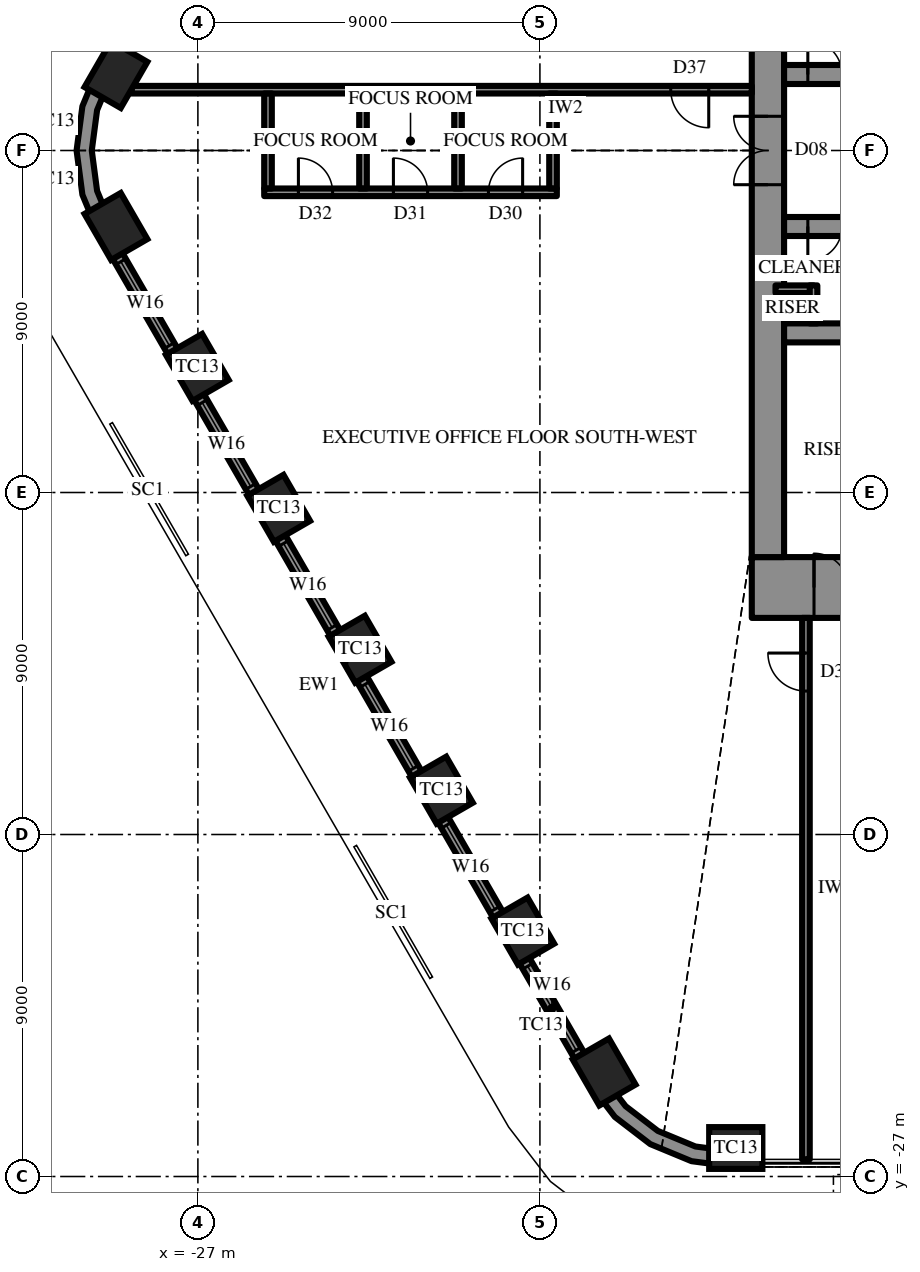
"""IFC4 building model, lengths in metres.
Left out: names, types, materials, properties, quantities, classifications, styles, units other than length and angle.
Written with IfcOpenShell. Run it as: python <this file> out.ifc"""

import sys

from ifc_helpers import new_model, si_unit, direction, frame, frame_2d, origin, origin_2d, place, context, subcontext, project, spatial, polyline, rectangle, outline, extrude, element, fill, save


model = new_model("IFC4")
c1 = context("Model", 3, precision=1e-05, world=origin(), true_north=direction((0.0, 1.0)))
c2 = subcontext(c1, "Body", "Model", "MODEL_VIEW")
j1 = project(units=[si_unit("LENGTHUNIT", "METRE"), si_unit("PLANEANGLEUNIT", "RADIAN")], contexts=[c1])
p1 = place(None, origin())
s1 = spatial("IfcSite", under=j1, at=p1, CompositionType="ELEMENT")
p2 = place(p1, origin())
s2 = spatial("IfcBuilding", under=s1, at=p2, CompositionType="ELEMENT")
p3 = place(p2, frame((0.0, 0.0, 315.7)))
s3 = spatial("IfcBuildingStorey", under=s2, at=p3, CompositionType="ELEMENT", Elevation=315.7)
for number, where, z_axis, x_axis in (
    (1, (-29.156, 2.0, 0.0), (0.0, 0.0, 1.0), (-0.5, -0.866, 0.0)),
    (2, (-29.156, -2.0, 0.0), (0.0, 0.0, 1.0), (0.5, -0.866, 0.0)),
    (3, (-27.015, -5.708, 0.0), (0.0, 0.0, 1.0), (0.5, -0.866, 0.0)),
    (4, (-24.874, -9.417, 0.0), (0.0, 0.0, 1.0), (0.5, -0.866, 0.0)),
    (5, (-22.733, -13.125, 0.0), (0.0, 0.0, 1.0), (0.5, -0.866, 0.0)),
    (6, (-20.592, -16.833, 0.0), (0.0, 0.0, 1.0), (0.5, -0.866, 0.0)),
    (7, (-18.451, -20.542, 0.0), (0.0, 0.0, 1.0), (0.5, -0.866, 0.0)),
    (8, (-16.31, -24.25, 0.0), (0.0, 0.0, 1.0), (0.5, -0.866, 0.0)),
    (9, (-12.846, -26.25, 0.0), (0.0, 0.0, 1.0), (1.0, 0.0, 0.0)),
):
    element("IfcColumn", number, at=place(p3, frame(where, z_axis=z_axis, x_axis=x_axis)), inside=s3, PredefinedType="COLUMN", context=c2, shape_type="SweptSolid", body=[
        extrude(rectangle(XDim=1.4, YDim=1.1, at=origin_2d()), origin(), (0.0, 0.0, 1.0), 4.2),
    ])
p4 = place(p3, frame((12.425, -11.5, 0.0), z_axis=(0.0, 0.0, 1.0), x_axis=(-1.0, 0.0, 0.0)))
e10 = element("IfcWall", 10, at=p4, inside=s3, PredefinedType="SHEAR", context=c2, shape_type="SweptSolid", body=[
    extrude(rectangle(XDim=24.85, YDim=1.6, at=frame_2d((12.425, 0.0))), origin(), (0.0, 0.0, 1.0), 4.2),
])
p5 = place(p4, frame((13.275, 0.0, 0.0)))
e11 = element("IfcOpeningElement", 11, at=p5, cuts=e10, PredefinedType="OPENING", context=c2, shape_type="SweptSolid", body=[
    extrude(rectangle(XDim=0.9, YDim=2.2, at=frame_2d((0.45, 1.1))), frame((0.0, 0.81, 0.0), z_axis=(0.0, -1.0, 0.0), x_axis=(1.0, 0.0, 0.0)), (0.0, 0.0, 1.0), 1.62),
])
p6 = place(p4, frame((16.275, 0.0, 0.0)))
e12 = element("IfcOpeningElement", 12, at=p6, cuts=e10, PredefinedType="OPENING", context=c2, shape_type="SweptSolid", body=[
    extrude(rectangle(XDim=0.9, YDim=2.2, at=frame_2d((0.45, 1.1))), frame((0.0, 0.81, 0.0), z_axis=(0.0, -1.0, 0.0), x_axis=(1.0, 0.0, 0.0)), (0.0, 0.0, 1.0), 1.62),
])
p7 = place(p4, frame((19.325, 0.0, 0.0)))
e13 = element("IfcOpeningElement", 13, at=p7, cuts=e10, PredefinedType="OPENING", context=c2, shape_type="SweptSolid", body=[
    extrude(rectangle(XDim=1.0, YDim=2.2, at=frame_2d((0.5, 1.1))), frame((0.0, 0.81, 0.0), z_axis=(0.0, -1.0, 0.0), x_axis=(1.0, 0.0, 0.0)), (0.0, 0.0, 1.0), 1.62),
])
p8 = place(p4, frame((1.637, 0.0, 0.0)))
e14 = element("IfcOpeningElement", 14, at=p8, cuts=e10, PredefinedType="OPENING", context=c2, shape_type="SweptSolid", body=[
    extrude(rectangle(XDim=0.9, YDim=2.2, at=frame_2d((0.45, 1.1))), frame((0.0, 0.81, 0.0), z_axis=(0.0, -1.0, 0.0), x_axis=(1.0, 0.0, 0.0)), (0.0, 0.0, 1.0), 1.62),
])
p9 = place(p4, frame((22.312, 0.0, 0.0)))
e15 = element("IfcOpeningElement", 15, at=p9, cuts=e10, PredefinedType="OPENING", context=c2, shape_type="SweptSolid", body=[
    extrude(rectangle(XDim=0.9, YDim=2.2, at=frame_2d((0.45, 1.1))), frame((0.0, 0.81, 0.0), z_axis=(0.0, -1.0, 0.0), x_axis=(1.0, 0.0, 0.0)), (0.0, 0.0, 1.0), 1.62),
])
p10 = place(p3, frame((-12.0, 10.7, 0.0), z_axis=(0.0, 0.0, 1.0), x_axis=(0.0, -1.0, 0.0)))
e16 = element("IfcWall", 16, at=p10, inside=s3, PredefinedType="SHEAR", context=c2, shape_type="SweptSolid", body=[
    extrude(rectangle(XDim=21.4, YDim=0.85, at=frame_2d((10.7, 0.0))), origin(), (0.0, 0.0, 1.0), 4.2),
])
p11 = place(p10, frame((9.8, 0.0, 0.0)))
e17 = element("IfcOpeningElement", 17, at=p11, cuts=e16, PredefinedType="OPENING", context=c2, shape_type="SweptSolid", body=[
    extrude(rectangle(XDim=1.8, YDim=2.4, at=frame_2d((0.9, 1.2))), frame((0.0, 0.435, 0.0), z_axis=(0.0, -1.0, 0.0), x_axis=(1.0, 0.0, 0.0)), (0.0, 0.0, 1.0), 0.87),
])
p12 = place(p3, frame((-11.575, 2.0, 0.0), z_axis=(0.0, 0.0, 1.0), x_axis=(1.0, 0.0, 0.0)))
e18 = element("IfcWall", 18, at=p12, inside=s3, PredefinedType="SHEAR", context=c2, shape_type="SweptSolid", body=[
    extrude(rectangle(XDim=5.775, YDim=0.5, at=frame_2d((2.887, 0.0))), origin(), (0.0, 0.0, 1.0), 4.2),
])
p13 = place(p12, frame((0.625, 0.0, 0.0)))
e19 = element("IfcOpeningElement", 19, at=p13, cuts=e18, PredefinedType="OPENING", context=c2, shape_type="SweptSolid", body=[
    extrude(rectangle(XDim=0.9, YDim=2.2, at=frame_2d((0.45, 1.1))), frame((0.0, 0.26, 0.0), z_axis=(0.0, -1.0, 0.0), x_axis=(1.0, 0.0, 0.0)), (0.0, 0.0, 1.0), 0.52),
])
p14 = place(p3, frame((3.2, -2.0, 0.0), z_axis=(0.0, 0.0, 1.0), x_axis=(-1.0, 0.0, 0.0)))
e20 = element("IfcWall", 20, at=p14, inside=s3, PredefinedType="SHEAR", context=c2, shape_type="SweptSolid", body=[
    extrude(rectangle(XDim=14.775, YDim=0.5, at=frame_2d((7.387, 0.0))), origin(), (0.0, 0.0, 1.0), 4.2),
])
p15 = place(p14, frame((13.25, 0.0, 0.0)))
e21 = element("IfcOpeningElement", 21, at=p15, cuts=e20, PredefinedType="OPENING", context=c2, shape_type="SweptSolid", body=[
    extrude(rectangle(XDim=0.9, YDim=2.2, at=frame_2d((0.45, 1.1))), frame((0.0, 0.26, 0.0), z_axis=(0.0, -1.0, 0.0), x_axis=(1.0, 0.0, 0.0)), (0.0, 0.0, 1.0), 0.52),
])
p16 = place(p14, frame((1.15, 0.0, 0.0)))
e22 = element("IfcOpeningElement", 22, at=p16, cuts=e20, PredefinedType="OPENING", context=c2, shape_type="SweptSolid", body=[
    extrude(rectangle(XDim=1.1, YDim=2.2, at=frame_2d((0.55, 1.1))), frame((0.0, 0.26, 0.0), z_axis=(0.0, -1.0, 0.0), x_axis=(1.0, 0.0, 0.0)), (0.0, 0.0, 1.0), 0.52),
])
p17 = place(p14, frame((4.15, 0.0, 0.0)))
e23 = element("IfcOpeningElement", 23, at=p17, cuts=e20, PredefinedType="OPENING", context=c2, shape_type="SweptSolid", body=[
    extrude(rectangle(XDim=1.1, YDim=2.2, at=frame_2d((0.55, 1.1))), frame((0.0, 0.26, 0.0), z_axis=(0.0, -1.0, 0.0), x_axis=(1.0, 0.0, 0.0)), (0.0, 0.0, 1.0), 0.52),
])
p18 = place(p14, frame((7.15, 0.0, 0.0)))
e24 = element("IfcOpeningElement", 24, at=p18, cuts=e20, PredefinedType="OPENING", context=c2, shape_type="SweptSolid", body=[
    extrude(rectangle(XDim=1.1, YDim=2.2, at=frame_2d((0.55, 1.1))), frame((0.0, 0.26, 0.0), z_axis=(0.0, -1.0, 0.0), x_axis=(1.0, 0.0, 0.0)), (0.0, 0.0, 1.0), 0.52),
])
p19 = place(p14, frame((10.15, 0.0, 0.0)))
e25 = element("IfcOpeningElement", 25, at=p19, cuts=e20, PredefinedType="OPENING", context=c2, shape_type="SweptSolid", body=[
    extrude(rectangle(XDim=1.1, YDim=2.2, at=frame_2d((0.55, 1.1))), frame((0.0, 0.26, 0.0), z_axis=(0.0, -1.0, 0.0), x_axis=(1.0, 0.0, 0.0)), (0.0, 0.0, 1.0), 0.52),
])
p20 = place(p3, frame((11.575, -4.8, 0.0), z_axis=(0.0, 0.0, 1.0), x_axis=(-1.0, 0.0, 0.0)))
e26 = element("IfcWall", 26, at=p20, inside=s3, PredefinedType="SHEAR", context=c2, shape_type="SweptSolid", body=[
    extrude(rectangle(XDim=23.15, YDim=0.5, at=frame_2d((11.575, 0.0))), origin(), (0.0, 0.0, 1.0), 4.2),
])
p21 = place(p20, frame((6.475, 0.0, 0.0)))
e27 = element("IfcOpeningElement", 27, at=p21, cuts=e26, PredefinedType="OPENING", context=c2, shape_type="SweptSolid", body=[
    extrude(rectangle(XDim=1.2, YDim=2.2, at=frame_2d((0.6, 1.1))), frame((0.0, 0.26, 0.0), z_axis=(0.0, -1.0, 0.0), x_axis=(1.0, 0.0, 0.0)), (0.0, 0.0, 1.0), 0.52),
])
p22 = place(p20, frame((3.475, 0.0, 0.0)))
e28 = element("IfcOpeningElement", 28, at=p22, cuts=e26, PredefinedType="OPENING", context=c2, shape_type="SweptSolid", body=[
    extrude(rectangle(XDim=1.2, YDim=2.2, at=frame_2d((0.6, 1.1))), frame((0.0, 0.26, 0.0), z_axis=(0.0, -1.0, 0.0), x_axis=(1.0, 0.0, 0.0)), (0.0, 0.0, 1.0), 0.52),
])
p23 = place(p3, origin())
e29 = element("IfcWall", 29, at=p23, inside=s3, PredefinedType="SOLIDWALL", context=c2, shape_type="SweptSolid", body=[
    extrude(outline(polyline([(-29.589, 2.25), (-30.039, 1.165), (-30.192, 0.0), (-30.039, -1.165), (-29.589, -2.25), (-29.243, -2.05), (-29.652, -1.061), (-29.792, 0.0), (-29.652, 1.061), (-29.243, 2.05), (-29.589, 2.25)])), origin(), (0.0, 0.0, 1.0), 2.0),
])
p24 = place(p3, origin())
e30 = element("IfcWall", 30, at=p24, inside=s3, PredefinedType="SOLIDWALL", context=c2, shape_type="SweptSolid", body=[
    extrude(outline(polyline([(-16.743, -24.5), (-16.028, -25.432), (-15.096, -26.147), (-14.011, -26.597), (-12.846, -26.75), (-12.846, -26.35), (-13.907, -26.21), (-14.896, -25.801), (-15.745, -25.149), (-16.397, -24.3), (-16.743, -24.5)])), origin(), (0.0, 0.0, 1.0), 2.0),
])
p25 = place(p3, frame((-29.459, -2.175, 0.0), z_axis=(0.0, 0.0, 1.0), x_axis=(0.499997191038, -0.866027025533, 0.0)))
e31 = element("IfcWall", 31, at=p25, inside=s3, PredefinedType="SOLIDWALL", context=c2, shape_type="SweptSolid", body=[
    extrude(rectangle(XDim=25.692, YDim=0.3, at=frame_2d((12.846, 0.0))), origin(), (0.0, 0.0, 1.0), 2.0),
])
p26 = place(p25, frame((0.866, 0.0, 0.6)))
e32 = element("IfcOpeningElement", 32, at=p26, cuts=e31, PredefinedType="OPENING", context=c2, shape_type="SweptSolid", body=[
    extrude(rectangle(XDim=2.55, YDim=1.15, at=frame_2d((1.275, 0.575))), frame((0.0, 0.16, 0.0), z_axis=(0.0, -1.0, 0.0), x_axis=(1.0, 0.0, 0.0)), (0.0, 0.0, 1.0), 0.32),
])
p27 = place(p25, frame((5.148, 0.0, 0.6)))
e33 = element("IfcOpeningElement", 33, at=p27, cuts=e31, PredefinedType="OPENING", context=c2, shape_type="SweptSolid", body=[
    extrude(rectangle(XDim=2.55, YDim=1.15, at=frame_2d((1.275, 0.575))), frame((0.0, 0.16, 0.0), z_axis=(0.0, -1.0, 0.0), x_axis=(1.0, 0.0, 0.0)), (0.0, 0.0, 1.0), 0.32),
])
p28 = place(p25, frame((9.43, 0.0, 0.6)))
e34 = element("IfcOpeningElement", 34, at=p28, cuts=e31, PredefinedType="OPENING", context=c2, shape_type="SweptSolid", body=[
    extrude(rectangle(XDim=2.55, YDim=1.15, at=frame_2d((1.275, 0.575))), frame((0.0, 0.16, 0.0), z_axis=(0.0, -1.0, 0.0), x_axis=(1.0, 0.0, 0.0)), (0.0, 0.0, 1.0), 0.32),
])
p29 = place(p25, frame((13.712, 0.0, 0.6)))
e35 = element("IfcOpeningElement", 35, at=p29, cuts=e31, PredefinedType="OPENING", context=c2, shape_type="SweptSolid", body=[
    extrude(rectangle(XDim=2.55, YDim=1.15, at=frame_2d((1.275, 0.575))), frame((0.0, 0.16, 0.0), z_axis=(0.0, -1.0, 0.0), x_axis=(1.0, 0.0, 0.0)), (0.0, 0.0, 1.0), 0.32),
])
p30 = place(p25, frame((17.994, 0.0, 0.6)))
e36 = element("IfcOpeningElement", 36, at=p30, cuts=e31, PredefinedType="OPENING", context=c2, shape_type="SweptSolid", body=[
    extrude(rectangle(XDim=2.55, YDim=1.15, at=frame_2d((1.275, 0.575))), frame((0.0, 0.16, 0.0), z_axis=(0.0, -1.0, 0.0), x_axis=(1.0, 0.0, 0.0)), (0.0, 0.0, 1.0), 0.32),
])
p31 = place(p25, frame((22.276, 0.0, 0.6)))
e37 = element("IfcOpeningElement", 37, at=p31, cuts=e31, PredefinedType="OPENING", context=c2, shape_type="SweptSolid", body=[
    extrude(rectangle(XDim=2.55, YDim=1.15, at=frame_2d((1.275, 0.575))), frame((0.0, 0.16, 0.0), z_axis=(0.0, -1.0, 0.0), x_axis=(1.0, 0.0, 0.0)), (0.0, 0.0, 1.0), 0.32),
])
for number, where, z_axis, x_axis in (
    (38, (-10.8, -3.65, 0.0), (0.0, 0.0, 1.0), (-1.0, 0.0, 0.0)),
    (39, (-10.8, -3.55, 0.0), (0.0, 0.0, 1.0), (0.0, -1.0, 0.0)),
):
    element("IfcWall", number, at=place(p3, frame(where, z_axis=z_axis, x_axis=x_axis)), inside=s3, PredefinedType="PARTITIONING", context=c2, shape_type="SweptSolid", body=[
        extrude(rectangle(XDim=1.0, YDim=0.2, at=frame_2d((0.5, 0.0))), origin(), (0.0, 0.0, 1.0), 4.0),
    ])
p32 = place(p3, frame((-11.0, -12.3, 0.0), z_axis=(0.0, 0.0, 1.0), x_axis=(0.0, -1.0, 0.0)))
e40 = element("IfcWall", 40, at=p32, inside=s3, PredefinedType="PARTITIONING", context=c2, shape_type="SweptSolid", body=[
    extrude(rectangle(XDim=14.25, YDim=0.2, at=frame_2d((7.125, 0.0))), origin(), (0.0, 0.0, 1.0), 4.0),
])
p33 = place(p32, frame((0.925, 0.0, 0.0)))
e41 = element("IfcOpeningElement", 41, at=p33, cuts=e40, PredefinedType="OPENING", context=c2, shape_type="SweptSolid", body=[
    extrude(rectangle(XDim=1.0, YDim=2.2, at=frame_2d((0.5, 1.1))), frame((0.0, 0.11, 0.0), z_axis=(0.0, -1.0, 0.0), x_axis=(1.0, 0.0, 0.0)), (0.0, 0.0, 1.0), 0.22),
])
p34 = place(p3, frame((-12.425, 1.6, 0.0), z_axis=(0.0, 0.0, 1.0), x_axis=(-1.0, 0.0, 0.0)))
e42 = element("IfcWall", 42, at=p34, inside=s3, PredefinedType="PARTITIONING", context=c2, shape_type="SweptSolid", body=[
    extrude(rectangle(XDim=16.327, YDim=0.2, at=frame_2d((8.164, 0.0))), origin(), (0.0, 0.0, 1.0), 4.0),
])
p35 = place(p34, frame((1.133, 0.0, 0.0)))
e43 = element("IfcOpeningElement", 43, at=p35, cuts=e42, PredefinedType="OPENING", context=c2, shape_type="SweptSolid", body=[
    extrude(rectangle(XDim=1.0, YDim=2.2, at=frame_2d((0.5, 1.1))), frame((0.0, 0.11, 0.0), z_axis=(0.0, -1.0, 0.0), x_axis=(1.0, 0.0, 0.0)), (0.0, 0.0, 1.0), 0.22),
])
p36 = place(p3, frame((-17.555, -1.1, 0.0), z_axis=(0.0, 0.0, 1.0), x_axis=(-1.0, 0.0, 0.0)))
e44 = element("IfcWall", 44, at=p36, inside=s3, PredefinedType="PARTITIONING", context=c2, shape_type="SweptSolid", body=[
    extrude(rectangle(XDim=7.7, YDim=0.2, at=frame_2d((3.85, 0.0))), origin(), (0.0, 0.0, 1.0), 4.0),
])
p37 = place(p36, frame((0.9, 0.0, 0.0)))
e45 = element("IfcOpeningElement", 45, at=p37, cuts=e44, PredefinedType="OPENING", context=c2, shape_type="SweptSolid", body=[
    extrude(rectangle(XDim=0.9, YDim=2.2, at=frame_2d((0.45, 1.1))), frame((0.0, 0.11, 0.0), z_axis=(0.0, -1.0, 0.0), x_axis=(1.0, 0.0, 0.0)), (0.0, 0.0, 1.0), 0.22),
])
p38 = place(p36, frame((3.4, 0.0, 0.0)))
e46 = element("IfcOpeningElement", 46, at=p38, cuts=e44, PredefinedType="OPENING", context=c2, shape_type="SweptSolid", body=[
    extrude(rectangle(XDim=0.9, YDim=2.2, at=frame_2d((0.45, 1.1))), frame((0.0, 0.11, 0.0), z_axis=(0.0, -1.0, 0.0), x_axis=(1.0, 0.0, 0.0)), (0.0, 0.0, 1.0), 0.22),
])
p39 = place(p36, frame((5.9, 0.0, 0.0)))
e47 = element("IfcOpeningElement", 47, at=p39, cuts=e44, PredefinedType="OPENING", context=c2, shape_type="SweptSolid", body=[
    extrude(rectangle(XDim=0.9, YDim=2.2, at=frame_2d((0.45, 1.1))), frame((0.0, 0.11, 0.0), z_axis=(0.0, -1.0, 0.0), x_axis=(1.0, 0.0, 0.0)), (0.0, 0.0, 1.0), 0.22),
])
for number, where, z_axis, x_axis in (
    (48, (-17.655, 1.5, 0.0), (0.0, 0.0, 1.0), (0.0, -1.0, 0.0)),
    (49, (-20.155, 1.5, 0.0), (0.0, 0.0, 1.0), (0.0, -1.0, 0.0)),
    (50, (-22.655, 1.5, 0.0), (0.0, 0.0, 1.0), (0.0, -1.0, 0.0)),
    (51, (-25.155, 1.5, 0.0), (0.0, 0.0, 1.0), (0.0, -1.0, 0.0)),
):
    element("IfcWall", number, at=place(p3, frame(where, z_axis=z_axis, x_axis=x_axis)), inside=s3, PredefinedType="PARTITIONING", context=c2, shape_type="SweptSolid", body=[
        extrude(rectangle(XDim=2.5, YDim=0.2, at=frame_2d((1.25, 0.0))), origin(), (0.0, 0.0, 1.0), 4.0),
    ])
p40 = place(p26, origin())
e52 = element("IfcWindow", 52, at=p40, inside=s3, PartitioningType="SINGLE_PANEL", PredefinedType="WINDOW", context=c2, shape_type="SweptSolid", body=[
    extrude(rectangle(XDim=2.55, YDim=1.15, at=frame_2d((1.275, 0.575))), frame((0.0, 0.03, 0.0), z_axis=(0.0, -1.0, 0.0), x_axis=(1.0, 0.0, 0.0)), (0.0, 0.0, 1.0), 0.06),
])
fill(e32, e52)
p41 = place(p27, origin())
e53 = element("IfcWindow", 53, at=p41, inside=s3, PartitioningType="SINGLE_PANEL", PredefinedType="WINDOW", context=c2, shape_type="SweptSolid", body=[
    extrude(rectangle(XDim=2.55, YDim=1.15, at=frame_2d((1.275, 0.575))), frame((0.0, 0.03, 0.0), z_axis=(0.0, -1.0, 0.0), x_axis=(1.0, 0.0, 0.0)), (0.0, 0.0, 1.0), 0.06),
])
fill(e33, e53)
p42 = place(p28, origin())
e54 = element("IfcWindow", 54, at=p42, inside=s3, PartitioningType="SINGLE_PANEL", PredefinedType="WINDOW", context=c2, shape_type="SweptSolid", body=[
    extrude(rectangle(XDim=2.55, YDim=1.15, at=frame_2d((1.275, 0.575))), frame((0.0, 0.03, 0.0), z_axis=(0.0, -1.0, 0.0), x_axis=(1.0, 0.0, 0.0)), (0.0, 0.0, 1.0), 0.06),
])
fill(e34, e54)
p43 = place(p29, origin())
e55 = element("IfcWindow", 55, at=p43, inside=s3, PartitioningType="SINGLE_PANEL", PredefinedType="WINDOW", context=c2, shape_type="SweptSolid", body=[
    extrude(rectangle(XDim=2.55, YDim=1.15, at=frame_2d((1.275, 0.575))), frame((0.0, 0.03, 0.0), z_axis=(0.0, -1.0, 0.0), x_axis=(1.0, 0.0, 0.0)), (0.0, 0.0, 1.0), 0.06),
])
fill(e35, e55)
p44 = place(p30, origin())
e56 = element("IfcWindow", 56, at=p44, inside=s3, PartitioningType="SINGLE_PANEL", PredefinedType="WINDOW", context=c2, shape_type="SweptSolid", body=[
    extrude(rectangle(XDim=2.55, YDim=1.15, at=frame_2d((1.275, 0.575))), frame((0.0, 0.03, 0.0), z_axis=(0.0, -1.0, 0.0), x_axis=(1.0, 0.0, 0.0)), (0.0, 0.0, 1.0), 0.06),
])
fill(e36, e56)
p45 = place(p31, origin())
e57 = element("IfcWindow", 57, at=p45, inside=s3, PartitioningType="SINGLE_PANEL", PredefinedType="WINDOW", context=c2, shape_type="SweptSolid", body=[
    extrude(rectangle(XDim=2.55, YDim=1.15, at=frame_2d((1.275, 0.575))), frame((0.0, 0.03, 0.0), z_axis=(0.0, -1.0, 0.0), x_axis=(1.0, 0.0, 0.0)), (0.0, 0.0, 1.0), 0.06),
])
fill(e37, e57)
p46 = place(p11, frame((1.8, 0.0, 0.0), z_axis=(0.0, 0.0, 1.0), x_axis=(-1.0, 0.0, 0.0)))
e58 = element("IfcDoor", 58, at=p46, inside=s3, OperationType="DOUBLE_DOOR_SINGLE_SWING", PredefinedType="DOOR", context=c2, shape_type="SweptSolid", body=[
    extrude(rectangle(XDim=1.8, YDim=2.4, at=frame_2d((0.9, 1.2))), frame((0.0, 0.025, 0.0), z_axis=(0.0, -1.0, 0.0), x_axis=(1.0, 0.0, 0.0)), (0.0, 0.0, 1.0), 0.05),
])
fill(e17, e58)
p47 = place(p9, frame((0.9, 0.0, 0.0), z_axis=(0.0, 0.0, 1.0), x_axis=(-1.0, 0.0, 0.0)))
e59 = element("IfcDoor", 59, at=p47, inside=s3, OperationType="SINGLE_SWING_RIGHT", PredefinedType="DOOR", context=c2, shape_type="SweptSolid", body=[
    extrude(rectangle(XDim=0.9, YDim=2.2, at=frame_2d((0.45, 1.1))), frame((0.0, 0.025, 0.0), z_axis=(0.0, -1.0, 0.0), x_axis=(1.0, 0.0, 0.0)), (0.0, 0.0, 1.0), 0.05),
])
fill(e15, e59)
p48 = place(p13, origin())
e60 = element("IfcDoor", 60, at=p48, inside=s3, OperationType="SINGLE_SWING_RIGHT", PredefinedType="DOOR", context=c2, shape_type="SweptSolid", body=[
    extrude(rectangle(XDim=0.9, YDim=2.2, at=frame_2d((0.45, 1.1))), frame((0.0, 0.025, 0.0), z_axis=(0.0, -1.0, 0.0), x_axis=(1.0, 0.0, 0.0)), (0.0, 0.0, 1.0), 0.05),
])
fill(e19, e60)
p49 = place(p15, origin())
e61 = element("IfcDoor", 61, at=p49, inside=s3, OperationType="SINGLE_SWING_LEFT", PredefinedType="DOOR", context=c2, shape_type="SweptSolid", body=[
    extrude(rectangle(XDim=0.9, YDim=2.2, at=frame_2d((0.45, 1.1))), frame((0.0, 0.025, 0.0), z_axis=(0.0, -1.0, 0.0), x_axis=(1.0, 0.0, 0.0)), (0.0, 0.0, 1.0), 0.05),
])
fill(e21, e61)
p50 = place(p33, frame((1.0, 0.0, 0.0), z_axis=(0.0, 0.0, 1.0), x_axis=(-1.0, 0.0, 0.0)))
e62 = element("IfcDoor", 62, at=p50, inside=s3, OperationType="SINGLE_SWING_LEFT", PredefinedType="DOOR", context=c2, shape_type="SweptSolid", body=[
    extrude(rectangle(XDim=1.0, YDim=2.2, at=frame_2d((0.5, 1.1))), frame((0.0, 0.025, 0.0), z_axis=(0.0, -1.0, 0.0), x_axis=(1.0, 0.0, 0.0)), (0.0, 0.0, 1.0), 0.05),
])
fill(e41, e62)
p51 = place(p35, origin())
e63 = element("IfcDoor", 63, at=p51, inside=s3, OperationType="SINGLE_SWING_RIGHT", PredefinedType="DOOR", context=c2, shape_type="SweptSolid", body=[
    extrude(rectangle(XDim=1.0, YDim=2.2, at=frame_2d((0.5, 1.1))), frame((0.0, 0.025, 0.0), z_axis=(0.0, -1.0, 0.0), x_axis=(1.0, 0.0, 0.0)), (0.0, 0.0, 1.0), 0.05),
])
fill(e43, e63)
p52 = place(p37, frame((0.9, 0.0, 0.0), z_axis=(0.0, 0.0, 1.0), x_axis=(-1.0, 0.0, 0.0)))
e64 = element("IfcDoor", 64, at=p52, inside=s3, OperationType="SINGLE_SWING_LEFT", PredefinedType="DOOR", context=c2, shape_type="SweptSolid", body=[
    extrude(rectangle(XDim=0.9, YDim=2.2, at=frame_2d((0.45, 1.1))), frame((0.0, 0.025, 0.0), z_axis=(0.0, -1.0, 0.0), x_axis=(1.0, 0.0, 0.0)), (0.0, 0.0, 1.0), 0.05),
])
fill(e45, e64)
p53 = place(p38, frame((0.9, 0.0, 0.0), z_axis=(0.0, 0.0, 1.0), x_axis=(-1.0, 0.0, 0.0)))
e65 = element("IfcDoor", 65, at=p53, inside=s3, OperationType="SINGLE_SWING_RIGHT", PredefinedType="DOOR", context=c2, shape_type="SweptSolid", body=[
    extrude(rectangle(XDim=0.9, YDim=2.2, at=frame_2d((0.45, 1.1))), frame((0.0, 0.025, 0.0), z_axis=(0.0, -1.0, 0.0), x_axis=(1.0, 0.0, 0.0)), (0.0, 0.0, 1.0), 0.05),
])
fill(e46, e65)
p54 = place(p39, frame((0.9, 0.0, 0.0), z_axis=(0.0, 0.0, 1.0), x_axis=(-1.0, 0.0, 0.0)))
e66 = element("IfcDoor", 66, at=p54, inside=s3, OperationType="SINGLE_SWING_RIGHT", PredefinedType="DOOR", context=c2, shape_type="SweptSolid", body=[
    extrude(rectangle(XDim=0.9, YDim=2.2, at=frame_2d((0.45, 1.1))), frame((0.0, 0.025, 0.0), z_axis=(0.0, -1.0, 0.0), x_axis=(1.0, 0.0, 0.0)), (0.0, 0.0, 1.0), 0.05),
])
fill(e47, e66)
save(model, sys.argv[1])
